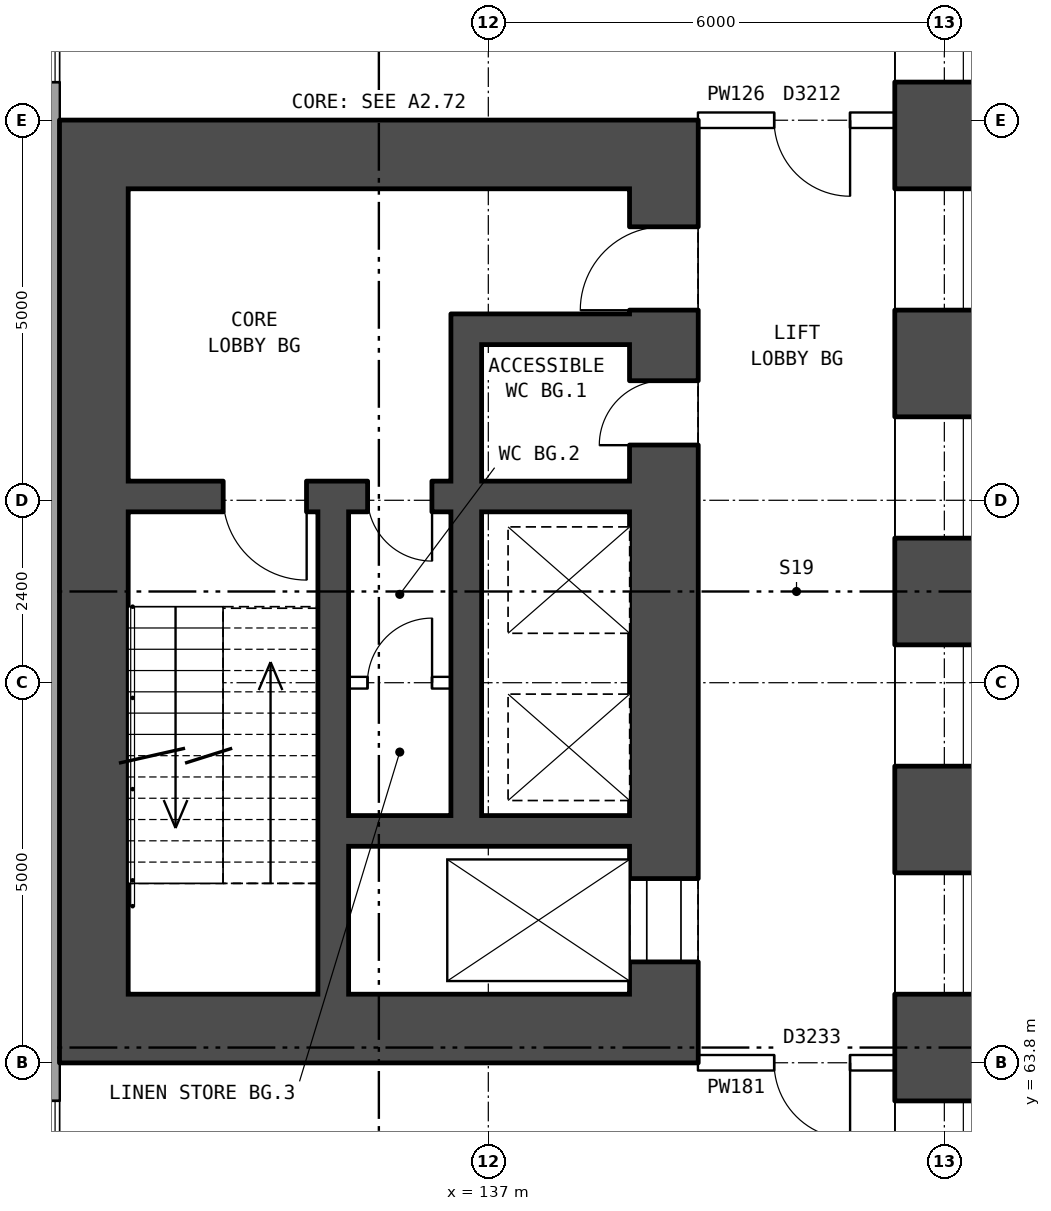
"""IFC4 building model, lengths in metres.
Left out: names, types, materials, properties, quantities, classifications, styles, units other than length and angle.
Written with IfcOpenShell. Run it as: python <this file> out.ifc"""

import sys

from ifc_helpers import new_model, si_unit, direction, frame, frame_2d, origin, place, context, subcontext, project, spatial, rectangle, extrude, element, fill, save


model = new_model("IFC4")
c1 = context("Model", 3, precision=1e-05, world=origin(), true_north=direction((0.0, 1.0)))
c2 = subcontext(c1, "Body", "Model", "MODEL_VIEW")
j1 = project(units=[si_unit("LENGTHUNIT", "METRE"), si_unit("PLANEANGLEUNIT", "RADIAN")], contexts=[c1])
p1 = place(None, origin())
s1 = spatial("IfcSite", under=j1, at=p1, CompositionType="ELEMENT")
p2 = place(p1, origin())
s2 = spatial("IfcBuilding", under=s1, at=p2, CompositionType="ELEMENT")
p3 = place(p2, frame((0.0, 0.0, 10.1)))
s3 = spatial("IfcBuildingStorey", under=s2, at=p3, CompositionType="ELEMENT", Elevation=10.1)
p4 = place(p3, frame((142.95, 56.4, -0.3), z_axis=(0.0, 0.0, 1.0), x_axis=(0.0, 1.0, 0.0)))
e1 = element("IfcWall", 1, at=p4, inside=s3, PredefinedType="SHEAR", context=c2, shape_type="SweptSolid", body=[
    extrude(rectangle(XDim=27.2, YDim=1.2, at=frame_2d((13.6, 0.0))), origin(), (0.0, 0.0, 1.0), 4.4),
])
p5 = place(p4, frame((2.3, 0.0, 0.8)))
e2 = element("IfcOpeningElement", 2, at=p5, cuts=e1, PredefinedType="OPENING", context=c2, shape_type="SweptSolid", body=[
    extrude(rectangle(XDim=1.6, YDim=1.8, at=frame_2d((0.8, 0.9))), frame((0.0, 0.61, 0.0), z_axis=(0.0, -1.0, 0.0), x_axis=(1.0, 0.0, 0.0)), (0.0, 0.0, 1.0), 1.22),
])
p6 = place(p4, frame((5.3, 0.0, 0.8)))
e3 = element("IfcOpeningElement", 3, at=p6, cuts=e1, PredefinedType="OPENING", context=c2, shape_type="SweptSolid", body=[
    extrude(rectangle(XDim=1.6, YDim=1.8, at=frame_2d((0.8, 0.9))), frame((0.0, 0.61, 0.0), z_axis=(0.0, -1.0, 0.0), x_axis=(1.0, 0.0, 0.0)), (0.0, 0.0, 1.0), 1.22),
])
p7 = place(p4, frame((8.3, 0.0, 0.8)))
e4 = element("IfcOpeningElement", 4, at=p7, cuts=e1, PredefinedType="OPENING", context=c2, shape_type="SweptSolid", body=[
    extrude(rectangle(XDim=1.6, YDim=1.8, at=frame_2d((0.8, 0.9))), frame((0.0, 0.61, 0.0), z_axis=(0.0, -1.0, 0.0), x_axis=(1.0, 0.0, 0.0)), (0.0, 0.0, 1.0), 1.22),
])
p8 = place(p4, frame((11.3, 0.0, 0.8)))
e5 = element("IfcOpeningElement", 5, at=p8, cuts=e1, PredefinedType="OPENING", context=c2, shape_type="SweptSolid", body=[
    extrude(rectangle(XDim=1.6, YDim=1.8, at=frame_2d((0.8, 0.9))), frame((0.0, 0.61, 0.0), z_axis=(0.0, -1.0, 0.0), x_axis=(1.0, 0.0, 0.0)), (0.0, 0.0, 1.0), 1.22),
])
p9 = place(p4, frame((14.3, 0.0, 0.8)))
e6 = element("IfcOpeningElement", 6, at=p9, cuts=e1, PredefinedType="OPENING", context=c2, shape_type="SweptSolid", body=[
    extrude(rectangle(XDim=1.6, YDim=1.8, at=frame_2d((0.8, 0.9))), frame((0.0, 0.61, 0.0), z_axis=(0.0, -1.0, 0.0), x_axis=(1.0, 0.0, 0.0)), (0.0, 0.0, 1.0), 1.22),
])
p10 = place(p4, frame((17.3, 0.0, 0.8)))
e7 = element("IfcOpeningElement", 7, at=p10, cuts=e1, PredefinedType="OPENING", context=c2, shape_type="SweptSolid", body=[
    extrude(rectangle(XDim=1.6, YDim=1.8, at=frame_2d((0.8, 0.9))), frame((0.0, 0.61, 0.0), z_axis=(0.0, -1.0, 0.0), x_axis=(1.0, 0.0, 0.0)), (0.0, 0.0, 1.0), 1.22),
])
p11 = place(p4, frame((20.3, 0.0, 0.8)))
e8 = element("IfcOpeningElement", 8, at=p11, cuts=e1, PredefinedType="OPENING", context=c2, shape_type="SweptSolid", body=[
    extrude(rectangle(XDim=1.6, YDim=1.8, at=frame_2d((0.8, 0.9))), frame((0.0, 0.61, 0.0), z_axis=(0.0, -1.0, 0.0), x_axis=(1.0, 0.0, 0.0)), (0.0, 0.0, 1.0), 1.22),
])
p12 = place(p4, frame((23.3, 0.0, 0.8)))
e9 = element("IfcOpeningElement", 9, at=p12, cuts=e1, PredefinedType="OPENING", context=c2, shape_type="SweptSolid", body=[
    extrude(rectangle(XDim=1.6, YDim=1.8, at=frame_2d((0.8, 0.9))), frame((0.0, 0.61, 0.0), z_axis=(0.0, -1.0, 0.0), x_axis=(1.0, 0.0, 0.0)), (0.0, 0.0, 1.0), 1.22),
])
p13 = place(p3, frame((131.18, 82.925, 0.0), z_axis=(0.0, 0.0, 1.0), x_axis=(0.0, -1.0, 0.0)))
e10 = element("IfcWall", 10, at=p13, inside=s3, PredefinedType="STANDARD", context=c2, shape_type="SweptSolid", body=[
    extrude(rectangle(XDim=25.851, YDim=0.36, at=frame_2d((12.925, 0.0))), origin(), (0.0, 0.0, 1.0), 4.3),
])
p14 = place(p13, frame((1.625, 0.0, 0.8)))
e11 = element("IfcOpeningElement", 11, at=p14, cuts=e10, PredefinedType="OPENING", context=c2, shape_type="SweptSolid", body=[
    extrude(rectangle(XDim=1.6, YDim=1.8, at=frame_2d((0.8, 0.9))), frame((0.0, 0.19, 0.0), z_axis=(0.0, -1.0, 0.0), x_axis=(1.0, 0.0, 0.0)), (0.0, 0.0, 1.0), 0.38),
])
p15 = place(p13, frame((4.625, 0.0, 0.8)))
e12 = element("IfcOpeningElement", 12, at=p15, cuts=e10, PredefinedType="OPENING", context=c2, shape_type="SweptSolid", body=[
    extrude(rectangle(XDim=1.6, YDim=1.8, at=frame_2d((0.8, 0.9))), frame((0.0, 0.19, 0.0), z_axis=(0.0, -1.0, 0.0), x_axis=(1.0, 0.0, 0.0)), (0.0, 0.0, 1.0), 0.38),
])
p16 = place(p13, frame((19.625, 0.0, 0.8)))
e13 = element("IfcOpeningElement", 13, at=p16, cuts=e10, PredefinedType="OPENING", context=c2, shape_type="SweptSolid", body=[
    extrude(rectangle(XDim=1.6, YDim=1.8, at=frame_2d((0.8, 0.9))), frame((0.0, 0.19, 0.0), z_axis=(0.0, -1.0, 0.0), x_axis=(1.0, 0.0, 0.0)), (0.0, 0.0, 1.0), 0.38),
])
p17 = place(p13, frame((22.625, 0.0, 0.8)))
e14 = element("IfcOpeningElement", 14, at=p17, cuts=e10, PredefinedType="OPENING", context=c2, shape_type="SweptSolid", body=[
    extrude(rectangle(XDim=1.6, YDim=1.8, at=frame_2d((0.8, 0.9))), frame((0.0, 0.19, 0.0), z_axis=(0.0, -1.0, 0.0), x_axis=(1.0, 0.0, 0.0)), (0.0, 0.0, 1.0), 0.38),
])
p18 = place(p3, frame((139.31, 64.7, 0.0), z_axis=(0.0, 0.0, 1.0), x_axis=(0.0, 1.0, 0.0)))
e15 = element("IfcWall", 15, at=p18, inside=s3, PredefinedType="SHEAR", context=c2, shape_type="SweptSolid", body=[
    extrude(rectangle(XDim=10.6, YDim=0.9, at=frame_2d((5.3, 0.0))), origin(), (0.0, 0.0, 1.0), 4.3),
])
p19 = place(p18, frame((0.425, 0.0, 0.0)))
e16 = element("IfcOpeningElement", 16, at=p19, cuts=e15, PredefinedType="OPENING", context=c2, shape_type="SweptSolid", body=[
    extrude(rectangle(XDim=1.1, YDim=2.1, at=frame_2d((0.55, 1.05))), frame((0.0, 0.46, 0.0), z_axis=(0.0, -1.0, 0.0), x_axis=(1.0, 0.0, 0.0)), (0.0, 0.0, 1.0), 0.92),
])
p20 = place(p18, frame((9.0, 0.0, 0.0)))
e17 = element("IfcOpeningElement", 17, at=p20, cuts=e15, PredefinedType="OPENING", context=c2, shape_type="SweptSolid", body=[
    extrude(rectangle(XDim=1.1, YDim=2.1, at=frame_2d((0.55, 1.05))), frame((0.0, 0.46, 0.0), z_axis=(0.0, -1.0, 0.0), x_axis=(1.0, 0.0, 0.0)), (0.0, 0.0, 1.0), 0.92),
])
p21 = place(p18, frame((7.225, 0.0, 0.0)))
e18 = element("IfcOpeningElement", 18, at=p21, cuts=e15, PredefinedType="OPENING", context=c2, shape_type="SweptSolid", body=[
    extrude(rectangle(XDim=0.85, YDim=2.1, at=frame_2d((0.425, 1.05))), frame((0.0, 0.46, 0.0), z_axis=(0.0, -1.0, 0.0), x_axis=(1.0, 0.0, 0.0)), (0.0, 0.0, 1.0), 0.92),
])
p22 = place(p3, frame((131.81, 64.7, 0.0), z_axis=(0.0, 0.0, 1.0), x_axis=(0.0, 1.0, 0.0)))
e19 = element("IfcWall", 19, at=p22, inside=s3, PredefinedType="SHEAR", context=c2, shape_type="SweptSolid", body=[
    extrude(rectangle(XDim=10.6, YDim=0.9, at=frame_2d((5.3, 0.0))), origin(), (0.0, 0.0, 1.0), 4.3),
])
for number, where, z_axis, x_axis in (
    (20, (139.76, 64.25, 0.0), (0.0, 0.0, 1.0), (-1.0, 0.0, 0.0)),
    (21, (139.76, 75.75, 0.0), (0.0, 0.0, 1.0), (-1.0, 0.0, 0.0)),
):
    element("IfcWall", number, at=place(p3, frame(where, z_axis=z_axis, x_axis=x_axis)), inside=s3, PredefinedType="SHEAR", context=c2, shape_type="SweptSolid", body=[
        extrude(rectangle(XDim=8.4, YDim=0.9, at=frame_2d((4.2, 0.0))), origin(), (0.0, 0.0, 1.0), 4.3),
    ])
p23 = place(p3, frame((138.86, 66.85, 0.0), z_axis=(0.0, 0.0, 1.0), x_axis=(-1.0, 0.0, 0.0)))
e22 = element("IfcWall", 22, at=p23, inside=s3, PredefinedType="SHEAR", context=c2, shape_type="SweptSolid", body=[
    extrude(rectangle(XDim=3.7, YDim=0.4, at=frame_2d((1.85, 0.0))), origin(), (0.0, 0.0, 1.0), 4.3),
])
p24 = place(p3, frame((136.51, 68.8, 0.0), z_axis=(0.0, 0.0, 1.0), x_axis=(-1.0, 0.0, 0.0)))
e23 = element("IfcWall", 23, at=p24, inside=s3, PredefinedType="PARTITIONING", context=c2, shape_type="SweptSolid", body=[
    extrude(rectangle(XDim=1.35, YDim=0.15, at=frame_2d((0.675, 0.0))), origin(), (0.0, 0.0, 1.0), 4.3),
])
p25 = place(p24, frame((0.25, 0.0, 0.0)))
e24 = element("IfcOpeningElement", 24, at=p25, cuts=e23, PredefinedType="OPENING", context=c2, shape_type="SweptSolid", body=[
    extrude(rectangle(XDim=0.85, YDim=2.1, at=frame_2d((0.425, 1.05))), frame((0.0, 0.085, 0.0), z_axis=(0.0, -1.0, 0.0), x_axis=(1.0, 0.0, 0.0)), (0.0, 0.0, 1.0), 0.17),
])
p26 = place(p3, frame((138.86, 71.25, 0.0), z_axis=(0.0, 0.0, 1.0), x_axis=(-1.0, 0.0, 0.0)))
e25 = element("IfcWall", 25, at=p26, inside=s3, PredefinedType="SHEAR", context=c2, shape_type="SweptSolid", body=[
    extrude(rectangle(XDim=6.6, YDim=0.4, at=frame_2d((3.3, 0.0))), origin(), (0.0, 0.0, 1.0), 4.3),
])
p27 = place(p26, frame((4.25, 0.0, 0.0)))
e26 = element("IfcOpeningElement", 26, at=p27, cuts=e25, PredefinedType="OPENING", context=c2, shape_type="SweptSolid", body=[
    extrude(rectangle(XDim=1.1, YDim=2.1, at=frame_2d((0.55, 1.05))), frame((0.0, 0.21, 0.0), z_axis=(0.0, -1.0, 0.0), x_axis=(1.0, 0.0, 0.0)), (0.0, 0.0, 1.0), 0.42),
])
p28 = place(p26, frame((2.6, 0.0, 0.0)))
e27 = element("IfcOpeningElement", 27, at=p28, cuts=e25, PredefinedType="OPENING", context=c2, shape_type="SweptSolid", body=[
    extrude(rectangle(XDim=0.85, YDim=2.1, at=frame_2d((0.425, 1.05))), frame((0.0, 0.21, 0.0), z_axis=(0.0, -1.0, 0.0), x_axis=(1.0, 0.0, 0.0)), (0.0, 0.0, 1.0), 0.42),
])
p29 = place(p3, frame((138.86, 73.45, 0.0), z_axis=(0.0, 0.0, 1.0), x_axis=(-1.0, 0.0, 0.0)))
e28 = element("IfcWall", 28, at=p29, inside=s3, PredefinedType="SHEAR", context=c2, shape_type="SweptSolid", body=[
    extrude(rectangle(XDim=1.95, YDim=0.4, at=frame_2d((0.975, 0.0))), origin(), (0.0, 0.0, 1.0), 4.3),
])
p30 = place(p3, frame((136.71, 67.05, 0.0), z_axis=(0.0, 0.0, 1.0), x_axis=(0.0, 1.0, 0.0)))
e29 = element("IfcWall", 29, at=p30, inside=s3, PredefinedType="SHEAR", context=c2, shape_type="SweptSolid", body=[
    extrude(rectangle(XDim=4.0, YDim=0.4, at=frame_2d((2.0, 0.0))), origin(), (0.0, 0.0, 1.0), 4.3),
])
p31 = place(p3, frame((136.71, 71.45, 0.0), z_axis=(0.0, 0.0, 1.0), x_axis=(0.0, 1.0, 0.0)))
e30 = element("IfcWall", 30, at=p31, inside=s3, PredefinedType="SHEAR", context=c2, shape_type="SweptSolid", body=[
    extrude(rectangle(XDim=2.2, YDim=0.4, at=frame_2d((1.1, 0.0))), origin(), (0.0, 0.0, 1.0), 4.3),
])
p32 = place(p3, frame((134.96, 64.7, 0.0), z_axis=(0.0, 0.0, 1.0), x_axis=(0.0, 1.0, 0.0)))
e31 = element("IfcWall", 31, at=p32, inside=s3, PredefinedType="SHEAR", context=c2, shape_type="SweptSolid", body=[
    extrude(rectangle(XDim=6.35, YDim=0.4, at=frame_2d((3.175, 0.0))), origin(), (0.0, 0.0, 1.0), 4.3),
])
p33 = place(p3, frame((139.76, 63.8, 0.0), z_axis=(0.0, 0.0, 1.0), x_axis=(1.0, 0.0, 0.0)))
e32 = element("IfcWall", 32, at=p33, inside=s3, PredefinedType="PARTITIONING", context=c2, shape_type="SweptSolid", body=[
    extrude(rectangle(XDim=2.59, YDim=0.2, at=frame_2d((1.295, 0.0))), origin(), (0.0, 0.0, 1.0), 4.3),
])
p34 = place(p33, frame((1.0, 0.0, 0.0)))
e33 = element("IfcOpeningElement", 33, at=p34, cuts=e32, PredefinedType="OPENING", context=c2, shape_type="SweptSolid", body=[
    extrude(rectangle(XDim=1.0, YDim=2.1, at=frame_2d((0.5, 1.05))), frame((0.0, 0.11, 0.0), z_axis=(0.0, -1.0, 0.0), x_axis=(1.0, 0.0, 0.0)), (0.0, 0.0, 1.0), 0.22),
])
p35 = place(p3, frame((139.76, 76.2, 0.0), z_axis=(0.0, 0.0, 1.0), x_axis=(1.0, 0.0, 0.0)))
e34 = element("IfcWall", 34, at=p35, inside=s3, PredefinedType="PARTITIONING", context=c2, shape_type="SweptSolid", body=[
    extrude(rectangle(XDim=2.59, YDim=0.2, at=frame_2d((1.295, 0.0))), origin(), (0.0, 0.0, 1.0), 4.3),
])
p36 = place(p35, frame((1.0, 0.0, 0.0)))
e35 = element("IfcOpeningElement", 35, at=p36, cuts=e34, PredefinedType="OPENING", context=c2, shape_type="SweptSolid", body=[
    extrude(rectangle(XDim=1.0, YDim=2.1, at=frame_2d((0.5, 1.05))), frame((0.0, 0.11, 0.0), z_axis=(0.0, -1.0, 0.0), x_axis=(1.0, 0.0, 0.0)), (0.0, 0.0, 1.0), 0.22),
])
p37 = place(p15, origin())
e36 = element("IfcWindow", 36, at=p37, inside=s3, PartitioningType="SINGLE_PANEL", PredefinedType="WINDOW", context=c2, shape_type="SweptSolid", body=[
    extrude(rectangle(XDim=1.6, YDim=1.8, at=frame_2d((0.8, 0.9))), frame((0.0, 0.15, 0.0), z_axis=(0.0, -1.0, 0.0), x_axis=(1.0, 0.0, 0.0)), (0.0, 0.0, 1.0), 0.06),
])
fill(e12, e36)
p38 = place(p16, origin())
e37 = element("IfcWindow", 37, at=p38, inside=s3, PartitioningType="SINGLE_PANEL", PredefinedType="WINDOW", context=c2, shape_type="SweptSolid", body=[
    extrude(rectangle(XDim=1.6, YDim=1.8, at=frame_2d((0.8, 0.9))), frame((0.0, 0.15, 0.0), z_axis=(0.0, -1.0, 0.0), x_axis=(1.0, 0.0, 0.0)), (0.0, 0.0, 1.0), 0.06),
])
fill(e13, e37)
p39 = place(p6, origin())
e38 = element("IfcWindow", 38, at=p39, inside=s3, PartitioningType="SINGLE_PANEL", PredefinedType="WINDOW", context=c2, shape_type="SweptSolid", body=[
    extrude(rectangle(XDim=1.6, YDim=1.8, at=frame_2d((0.8, 0.9))), frame((0.0, -0.27, 0.0), z_axis=(0.0, -1.0, 0.0), x_axis=(1.0, 0.0, 0.0)), (0.0, 0.0, 1.0), 0.06),
])
fill(e3, e38)
p40 = place(p7, origin())
e39 = element("IfcWindow", 39, at=p40, inside=s3, PartitioningType="SINGLE_PANEL", PredefinedType="WINDOW", context=c2, shape_type="SweptSolid", body=[
    extrude(rectangle(XDim=1.6, YDim=1.8, at=frame_2d((0.8, 0.9))), frame((0.0, -0.27, 0.0), z_axis=(0.0, -1.0, 0.0), x_axis=(1.0, 0.0, 0.0)), (0.0, 0.0, 1.0), 0.06),
])
fill(e4, e39)
p41 = place(p8, origin())
e40 = element("IfcWindow", 40, at=p41, inside=s3, PartitioningType="SINGLE_PANEL", PredefinedType="WINDOW", context=c2, shape_type="SweptSolid", body=[
    extrude(rectangle(XDim=1.6, YDim=1.8, at=frame_2d((0.8, 0.9))), frame((0.0, -0.27, 0.0), z_axis=(0.0, -1.0, 0.0), x_axis=(1.0, 0.0, 0.0)), (0.0, 0.0, 1.0), 0.06),
])
fill(e5, e40)
p42 = place(p9, origin())
e41 = element("IfcWindow", 41, at=p42, inside=s3, PartitioningType="SINGLE_PANEL", PredefinedType="WINDOW", context=c2, shape_type="SweptSolid", body=[
    extrude(rectangle(XDim=1.6, YDim=1.8, at=frame_2d((0.8, 0.9))), frame((0.0, -0.27, 0.0), z_axis=(0.0, -1.0, 0.0), x_axis=(1.0, 0.0, 0.0)), (0.0, 0.0, 1.0), 0.06),
])
fill(e6, e41)
p43 = place(p10, origin())
e42 = element("IfcWindow", 42, at=p43, inside=s3, PartitioningType="SINGLE_PANEL", PredefinedType="WINDOW", context=c2, shape_type="SweptSolid", body=[
    extrude(rectangle(XDim=1.6, YDim=1.8, at=frame_2d((0.8, 0.9))), frame((0.0, -0.27, 0.0), z_axis=(0.0, -1.0, 0.0), x_axis=(1.0, 0.0, 0.0)), (0.0, 0.0, 1.0), 0.06),
])
fill(e7, e42)
p44 = place(p11, origin())
e43 = element("IfcWindow", 43, at=p44, inside=s3, PartitioningType="SINGLE_PANEL", PredefinedType="WINDOW", context=c2, shape_type="SweptSolid", body=[
    extrude(rectangle(XDim=1.6, YDim=1.8, at=frame_2d((0.8, 0.9))), frame((0.0, -0.27, 0.0), z_axis=(0.0, -1.0, 0.0), x_axis=(1.0, 0.0, 0.0)), (0.0, 0.0, 1.0), 0.06),
])
fill(e8, e43)
p45 = place(p19, origin())
e44 = element("IfcDoor", 44, at=p45, inside=s3, OperationType="DOUBLE_DOOR_SLIDING", PredefinedType="DOOR", context=c2, shape_type="SweptSolid", body=[
    extrude(rectangle(XDim=1.1, YDim=2.1, at=frame_2d((0.55, 1.05))), frame((0.0, 0.435, 0.0), z_axis=(0.0, -1.0, 0.0), x_axis=(1.0, 0.0, 0.0)), (0.0, 0.0, 1.0), 0.05),
])
fill(e16, e44)
p46 = place(p20, origin())
e45 = element("IfcDoor", 45, at=p46, inside=s3, OperationType="SINGLE_SWING_LEFT", PredefinedType="DOOR", context=c2, shape_type="SweptSolid", body=[
    extrude(rectangle(XDim=1.1, YDim=2.1, at=frame_2d((0.55, 1.05))), frame((0.0, 0.435, 0.0), z_axis=(0.0, -1.0, 0.0), x_axis=(1.0, 0.0, 0.0)), (0.0, 0.0, 1.0), 0.05),
])
fill(e17, e45)
p47 = place(p27, origin())
e46 = element("IfcDoor", 46, at=p47, inside=s3, OperationType="SINGLE_SWING_LEFT", PredefinedType="DOOR", context=c2, shape_type="SweptSolid", body=[
    extrude(rectangle(XDim=1.1, YDim=2.1, at=frame_2d((0.55, 1.05))), frame((0.0, 0.025, 0.0), z_axis=(0.0, -1.0, 0.0), x_axis=(1.0, 0.0, 0.0)), (0.0, 0.0, 1.0), 0.05),
])
fill(e26, e46)
p48 = place(p21, origin())
e47 = element("IfcDoor", 47, at=p48, inside=s3, OperationType="SINGLE_SWING_LEFT", PredefinedType="DOOR", context=c2, shape_type="SweptSolid", body=[
    extrude(rectangle(XDim=0.85, YDim=2.1, at=frame_2d((0.425, 1.05))), frame((0.0, 0.435, 0.0), z_axis=(0.0, -1.0, 0.0), x_axis=(1.0, 0.0, 0.0)), (0.0, 0.0, 1.0), 0.05),
])
fill(e18, e47)
p49 = place(p28, origin())
e48 = element("IfcDoor", 48, at=p49, inside=s3, OperationType="SINGLE_SWING_LEFT", PredefinedType="DOOR", context=c2, shape_type="SweptSolid", body=[
    extrude(rectangle(XDim=0.85, YDim=2.1, at=frame_2d((0.425, 1.05))), frame((0.0, 0.025, 0.0), z_axis=(0.0, -1.0, 0.0), x_axis=(1.0, 0.0, 0.0)), (0.0, 0.0, 1.0), 0.05),
])
fill(e27, e48)
p50 = place(p25, frame((0.85, 0.0, 0.0), z_axis=(0.0, 0.0, 1.0), x_axis=(-1.0, 0.0, 0.0)))
e49 = element("IfcDoor", 49, at=p50, inside=s3, OperationType="SINGLE_SWING_RIGHT", PredefinedType="DOOR", context=c2, shape_type="SweptSolid", body=[
    extrude(rectangle(XDim=0.85, YDim=2.1, at=frame_2d((0.425, 1.05))), frame((0.0, 0.025, 0.0), z_axis=(0.0, -1.0, 0.0), x_axis=(1.0, 0.0, 0.0)), (0.0, 0.0, 1.0), 0.05),
])
fill(e24, e49)
p51 = place(p34, frame((1.0, 0.0, 0.0), z_axis=(0.0, 0.0, 1.0), x_axis=(-1.0, 0.0, 0.0)))
e50 = element("IfcDoor", 50, at=p51, inside=s3, OperationType="SINGLE_SWING_LEFT", PredefinedType="DOOR", context=c2, shape_type="SweptSolid", body=[
    extrude(rectangle(XDim=1.0, YDim=2.1, at=frame_2d((0.5, 1.05))), frame((0.0, 0.025, 0.0), z_axis=(0.0, -1.0, 0.0), x_axis=(1.0, 0.0, 0.0)), (0.0, 0.0, 1.0), 0.05),
])
fill(e33, e50)
p52 = place(p36, frame((1.0, 0.0, 0.0), z_axis=(0.0, 0.0, 1.0), x_axis=(-1.0, 0.0, 0.0)))
e51 = element("IfcDoor", 51, at=p52, inside=s3, OperationType="SINGLE_SWING_LEFT", PredefinedType="DOOR", context=c2, shape_type="SweptSolid", body=[
    extrude(rectangle(XDim=1.0, YDim=2.1, at=frame_2d((0.5, 1.05))), frame((0.0, 0.025, 0.0), z_axis=(0.0, -1.0, 0.0), x_axis=(1.0, 0.0, 0.0)), (0.0, 0.0, 1.0), 0.05),
])
fill(e35, e51)
save(model, sys.argv[1])
